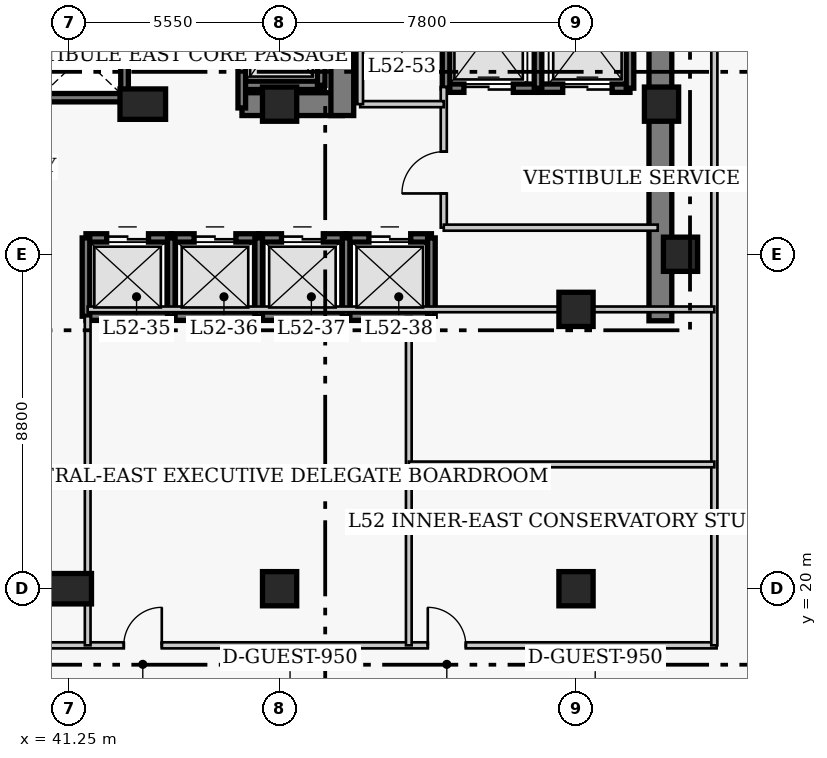
"""IFC4 building model, lengths in metres.
Left out: names, types, materials, properties, quantities, classifications, styles, units other than length and angle.
Written with IfcOpenShell. Run it as: python <this file> out.ifc"""

import sys

from ifc_helpers import new_model, si_unit, direction, frame, frame_2d, origin, origin_2d, place, context, subcontext, project, spatial, rectangle, extrude, element, fill, save


model = new_model("IFC4")
c1 = context("Model", 3, precision=1e-05, world=origin(), true_north=direction((0.0, 1.0)))
c2 = subcontext(c1, "Body", "Model", "MODEL_VIEW")
j1 = project(units=[si_unit("LENGTHUNIT", "METRE"), si_unit("PLANEANGLEUNIT", "RADIAN")], contexts=[c1])
p1 = place(None, origin())
s1 = spatial("IfcSite", under=j1, at=p1, CompositionType="ELEMENT")
p2 = place(p1, origin())
s2 = spatial("IfcBuilding", under=s1, at=p2, CompositionType="ELEMENT")
p3 = place(p2, frame((0.0, 0.0, 208.5)))
s3 = spatial("IfcBuildingStorey", under=s2, at=p3, CompositionType="ELEMENT", Elevation=208.5)
p4 = place(p3, frame((56.82, 27.05, 0.0), z_axis=(0.0, 0.0, 1.0), x_axis=(0.0, 1.0, 0.0)))
e1 = element("IfcWall", 1, at=p4, inside=s3, PredefinedType="SHEAR", context=c2, shape_type="SweptSolid", body=[
    extrude(rectangle(XDim=13.57, YDim=0.6, at=frame_2d((6.785, 0.0))), origin(), (0.0, 0.0, 1.0), 3.9),
])
p5 = place(p3, frame((45.81, 32.75, 0.0), z_axis=(0.0, 0.0, 1.0), x_axis=(1.0, 0.0, 0.0)))
e2 = element("IfcWall", 2, at=p5, inside=s3, PredefinedType="SHEAR", context=c2, shape_type="SweptSolid", body=[
    extrude(rectangle(XDim=2.64, YDim=0.6, at=frame_2d((1.32, 0.0))), origin(), (0.0, 0.0, 1.0), 3.9),
])
p6 = place(p3, frame((48.45, 32.45, 0.0), z_axis=(0.0, 0.0, 1.0), x_axis=(0.0, 1.0, 0.0)))
e3 = element("IfcWall", 3, at=p6, inside=s3, PredefinedType="SHEAR", context=c2, shape_type="SweptSolid", body=[
    extrude(rectangle(XDim=7.87, YDim=0.6, at=frame_2d((3.935, 0.0))), origin(), (0.0, 0.0, 1.0), 3.9),
])
p7 = place(p6, frame((5.75, 0.0, 0.0)))
e4 = element("IfcOpeningElement", 4, at=p7, cuts=e3, PredefinedType="OPENING", context=c2, shape_type="SweptSolid", body=[
    extrude(rectangle(XDim=1.1, YDim=2.15, at=frame_2d((0.55, 1.075))), frame((0.0, 0.31, 0.0), z_axis=(0.0, -1.0, 0.0), x_axis=(1.0, 0.0, 0.0)), (0.0, 0.0, 1.0), 0.62),
])
p8 = place(p3, frame((41.25, 20.0, 0.0), z_axis=(0.0, 0.0, 1.0), x_axis=(1.0, 0.0, 0.0)))
e5 = element("IfcColumn", 5, at=p8, inside=s3, PredefinedType="COLUMN", context=c2, shape_type="SweptSolid", body=[
    extrude(rectangle(XDim=1.2, YDim=0.8, at=origin_2d()), origin(), (0.0, 0.0, 1.0), 3.9),
])
for number, where, z_axis, x_axis in (
    (6, (46.8, 20.0, 0.0), (0.0, 0.0, 1.0), (1.0, 0.0, 0.0)),
    (7, (54.6, 20.0, 0.0), (0.0, 0.0, 1.0), (1.0, 0.0, 0.0)),
    (8, (57.35, 28.8, 0.0), (0.0, 0.0, 1.0), (1.0, 0.0, 0.0)),
):
    element("IfcColumn", number, at=place(p3, frame(where, z_axis=z_axis, x_axis=x_axis)), inside=s3, PredefinedType="COLUMN", context=c2, shape_type="SweptSolid", body=[
        extrude(rectangle(XDim=0.9, YDim=0.9, at=origin_2d()), origin(), (0.0, 0.0, 1.0), 3.9),
    ])
p9 = place(p3, frame((43.2, 32.75, 0.0), z_axis=(0.0, 0.0, 1.0), x_axis=(1.0, 0.0, 0.0)))
e9 = element("IfcColumn", 9, at=p9, inside=s3, PredefinedType="COLUMN", context=c2, shape_type="SweptSolid", body=[
    extrude(rectangle(XDim=1.2, YDim=0.8, at=origin_2d()), origin(), (0.0, 0.0, 1.0), 3.9),
])
for number, where, z_axis, x_axis in (
    (10, (46.8, 32.75, 0.0), (0.0, 0.0, 1.0), (1.0, 0.0, 0.0)),
    (11, (54.6, 27.35, 0.0), (0.0, 0.0, 1.0), (1.0, 0.0, 0.0)),
    (12, (56.85, 32.75, 0.0), (0.0, 0.0, 1.0), (1.0, 0.0, 0.0)),
):
    element("IfcColumn", number, at=place(p3, frame(where, z_axis=z_axis, x_axis=x_axis)), inside=s3, PredefinedType="COLUMN", context=c2, shape_type="SweptSolid", body=[
        extrude(rectangle(XDim=0.9, YDim=0.9, at=origin_2d()), origin(), (0.0, 0.0, 1.0), 3.9),
    ])
p10 = place(p3, frame((41.705, 29.23, 0.0), z_axis=(0.0, 0.0, 1.0), x_axis=(1.0, 0.0, 0.0)))
e13 = element("IfcWall", 13, at=p10, inside=s3, PredefinedType="SHEAR", context=c2, shape_type="SweptSolid", body=[
    extrude(rectangle(XDim=2.245, YDim=0.22, at=frame_2d((1.123, 0.0))), origin(), (0.0, 0.0, 1.0), 3.9),
])
p11 = place(p10, frame((0.545, 0.0, 0.0)))
e14 = element("IfcOpeningElement", 14, at=p11, cuts=e13, PredefinedType="OPENING", context=c2, shape_type="SweptSolid", body=[
    extrude(rectangle(XDim=1.1, YDim=2.15, at=frame_2d((0.55, 1.075))), frame((0.0, 0.12, 0.0), z_axis=(0.0, -1.0, 0.0), x_axis=(1.0, 0.0, 0.0)), (0.0, 0.0, 1.0), 0.24),
])
p12 = place(p3, frame((41.705, 27.17, 0.0), z_axis=(0.0, 0.0, 1.0), x_axis=(1.0, 0.0, 0.0)))
e15 = element("IfcWall", 15, at=p12, inside=s3, PredefinedType="SHEAR", context=c2, shape_type="SweptSolid", body=[
    extrude(rectangle(XDim=2.245, YDim=0.22, at=frame_2d((1.123, 0.0))), origin(), (0.0, 0.0, 1.0), 3.9),
])
p13 = place(p3, frame((41.705, 27.17, 0.0), z_axis=(0.0, 0.0, 1.0), x_axis=(0.0, 1.0, 0.0)))
e16 = element("IfcWall", 16, at=p13, inside=s3, PredefinedType="SHEAR", context=c2, shape_type="SweptSolid", body=[
    extrude(rectangle(XDim=2.06, YDim=0.2, at=frame_2d((1.03, 0.0))), origin(), (0.0, 0.0, 1.0), 3.9),
])
p14 = place(p3, frame((43.95, 29.23, 0.0), z_axis=(0.0, 0.0, 1.0), x_axis=(1.0, 0.0, 0.0)))
e17 = element("IfcWall", 17, at=p14, inside=s3, PredefinedType="SHEAR", context=c2, shape_type="SweptSolid", body=[
    extrude(rectangle(XDim=2.3, YDim=0.22, at=frame_2d((1.15, 0.0))), origin(), (0.0, 0.0, 1.0), 3.9),
])
p15 = place(p14, frame((0.6, 0.0, 0.0)))
e18 = element("IfcOpeningElement", 18, at=p15, cuts=e17, PredefinedType="OPENING", context=c2, shape_type="SweptSolid", body=[
    extrude(rectangle(XDim=1.1, YDim=2.15, at=frame_2d((0.55, 1.075))), frame((0.0, 0.12, 0.0), z_axis=(0.0, -1.0, 0.0), x_axis=(1.0, 0.0, 0.0)), (0.0, 0.0, 1.0), 0.24),
])
p16 = place(p3, frame((43.95, 27.17, 0.0), z_axis=(0.0, 0.0, 1.0), x_axis=(1.0, 0.0, 0.0)))
e19 = element("IfcWall", 19, at=p16, inside=s3, PredefinedType="SHEAR", context=c2, shape_type="SweptSolid", body=[
    extrude(rectangle(XDim=2.3, YDim=0.22, at=frame_2d((1.15, 0.0))), origin(), (0.0, 0.0, 1.0), 3.9),
])
p17 = place(p3, frame((43.95, 27.17, 0.0), z_axis=(0.0, 0.0, 1.0), x_axis=(0.0, 1.0, 0.0)))
e20 = element("IfcWall", 20, at=p17, inside=s3, PredefinedType="SHEAR", context=c2, shape_type="SweptSolid", body=[
    extrude(rectangle(XDim=2.06, YDim=0.2, at=frame_2d((1.03, 0.0))), origin(), (0.0, 0.0, 1.0), 3.9),
])
p18 = place(p3, frame((46.25, 29.23, 0.0), z_axis=(0.0, 0.0, 1.0), x_axis=(1.0, 0.0, 0.0)))
e21 = element("IfcWall", 21, at=p18, inside=s3, PredefinedType="SHEAR", context=c2, shape_type="SweptSolid", body=[
    extrude(rectangle(XDim=2.3, YDim=0.22, at=frame_2d((1.15, 0.0))), origin(), (0.0, 0.0, 1.0), 3.9),
])
p19 = place(p18, frame((0.6, 0.0, 0.0)))
e22 = element("IfcOpeningElement", 22, at=p19, cuts=e21, PredefinedType="OPENING", context=c2, shape_type="SweptSolid", body=[
    extrude(rectangle(XDim=1.1, YDim=2.15, at=frame_2d((0.55, 1.075))), frame((0.0, 0.12, 0.0), z_axis=(0.0, -1.0, 0.0), x_axis=(1.0, 0.0, 0.0)), (0.0, 0.0, 1.0), 0.24),
])
p20 = place(p3, frame((46.25, 27.17, 0.0), z_axis=(0.0, 0.0, 1.0), x_axis=(1.0, 0.0, 0.0)))
e23 = element("IfcWall", 23, at=p20, inside=s3, PredefinedType="SHEAR", context=c2, shape_type="SweptSolid", body=[
    extrude(rectangle(XDim=2.3, YDim=0.22, at=frame_2d((1.15, 0.0))), origin(), (0.0, 0.0, 1.0), 3.9),
])
p21 = place(p3, frame((46.25, 27.17, 0.0), z_axis=(0.0, 0.0, 1.0), x_axis=(0.0, 1.0, 0.0)))
e24 = element("IfcWall", 24, at=p21, inside=s3, PredefinedType="SHEAR", context=c2, shape_type="SweptSolid", body=[
    extrude(rectangle(XDim=2.06, YDim=0.2, at=frame_2d((1.03, 0.0))), origin(), (0.0, 0.0, 1.0), 3.9),
])
p22 = place(p3, frame((48.55, 29.23, 0.0), z_axis=(0.0, 0.0, 1.0), x_axis=(1.0, 0.0, 0.0)))
e25 = element("IfcWall", 25, at=p22, inside=s3, PredefinedType="SHEAR", context=c2, shape_type="SweptSolid", body=[
    extrude(rectangle(XDim=2.245, YDim=0.22, at=frame_2d((1.123, 0.0))), origin(), (0.0, 0.0, 1.0), 3.9),
])
p23 = place(p22, frame((0.6, 0.0, 0.0)))
e26 = element("IfcOpeningElement", 26, at=p23, cuts=e25, PredefinedType="OPENING", context=c2, shape_type="SweptSolid", body=[
    extrude(rectangle(XDim=1.1, YDim=2.15, at=frame_2d((0.55, 1.075))), frame((0.0, 0.12, 0.0), z_axis=(0.0, -1.0, 0.0), x_axis=(1.0, 0.0, 0.0)), (0.0, 0.0, 1.0), 0.24),
])
p24 = place(p3, frame((48.55, 27.17, 0.0), z_axis=(0.0, 0.0, 1.0), x_axis=(1.0, 0.0, 0.0)))
e27 = element("IfcWall", 27, at=p24, inside=s3, PredefinedType="SHEAR", context=c2, shape_type="SweptSolid", body=[
    extrude(rectangle(XDim=2.245, YDim=0.22, at=frame_2d((1.123, 0.0))), origin(), (0.0, 0.0, 1.0), 3.9),
])
for number, where, z_axis, x_axis in (
    (28, (48.55, 27.17, 0.0), (0.0, 0.0, 1.0), (0.0, 1.0, 0.0)),
    (29, (50.795, 27.17, 0.0), (0.0, 0.0, 1.0), (0.0, 1.0, 0.0)),
):
    element("IfcWall", number, at=place(p3, frame(where, z_axis=z_axis, x_axis=x_axis)), inside=s3, PredefinedType="SHEAR", context=c2, shape_type="SweptSolid", body=[
        extrude(rectangle(XDim=2.06, YDim=0.2, at=frame_2d((1.03, 0.0))), origin(), (0.0, 0.0, 1.0), 3.9),
    ])
p25 = place(p3, frame((40.4, 32.92, 0.0), z_axis=(0.0, 0.0, 1.0), x_axis=(1.0, 0.0, 0.0)))
e30 = element("IfcWall", 30, at=p25, inside=s3, PredefinedType="SHEAR", context=c2, shape_type="SweptSolid", body=[
    extrude(rectangle(XDim=2.32, YDim=0.22, at=frame_2d((1.16, 0.0))), origin(), (0.0, 0.0, 1.0), 3.9),
])
p26 = place(p3, frame((42.72, 32.92, 0.0), z_axis=(0.0, 0.0, 1.0), x_axis=(0.0, 1.0, 0.0)))
e31 = element("IfcWall", 31, at=p26, inside=s3, PredefinedType="SHEAR", context=c2, shape_type="SweptSolid", body=[
    extrude(rectangle(XDim=2.16, YDim=0.2, at=frame_2d((1.08, 0.0))), origin(), (0.0, 0.0, 1.0), 3.9),
])
p27 = place(p3, frame((51.18, 33.17, 0.0), z_axis=(0.0, 0.0, 1.0), x_axis=(1.0, 0.0, 0.0)))
e32 = element("IfcWall", 32, at=p27, inside=s3, PredefinedType="SHEAR", context=c2, shape_type="SweptSolid", body=[
    extrude(rectangle(XDim=2.42, YDim=0.22, at=frame_2d((1.21, 0.0))), origin(), (0.0, 0.0, 1.0), 3.9),
])
p28 = place(p27, frame((0.47, 0.0, 0.0)))
e33 = element("IfcOpeningElement", 33, at=p28, cuts=e32, PredefinedType="OPENING", context=c2, shape_type="SweptSolid", body=[
    extrude(rectangle(XDim=1.3, YDim=2.15, at=frame_2d((0.65, 1.075))), frame((0.0, 0.12, 0.0), z_axis=(0.0, -1.0, 0.0), x_axis=(1.0, 0.0, 0.0)), (0.0, 0.0, 1.0), 0.24),
])
p29 = place(p3, frame((51.18, 33.17, 0.0), z_axis=(0.0, 0.0, 1.0), x_axis=(0.0, 1.0, 0.0)))
e34 = element("IfcWall", 34, at=p29, inside=s3, PredefinedType="SHEAR", context=c2, shape_type="SweptSolid", body=[
    extrude(rectangle(XDim=2.86, YDim=0.2, at=frame_2d((1.43, 0.0))), origin(), (0.0, 0.0, 1.0), 3.9),
])
p30 = place(p3, frame((53.6, 33.17, 0.0), z_axis=(0.0, 0.0, 1.0), x_axis=(1.0, 0.0, 0.0)))
e35 = element("IfcWall", 35, at=p30, inside=s3, PredefinedType="SHEAR", context=c2, shape_type="SweptSolid", body=[
    extrude(rectangle(XDim=2.42, YDim=0.22, at=frame_2d((1.21, 0.0))), origin(), (0.0, 0.0, 1.0), 3.9),
])
p31 = place(p30, frame((0.65, 0.0, 0.0)))
e36 = element("IfcOpeningElement", 36, at=p31, cuts=e35, PredefinedType="OPENING", context=c2, shape_type="SweptSolid", body=[
    extrude(rectangle(XDim=1.3, YDim=2.15, at=frame_2d((0.65, 1.075))), frame((0.0, 0.12, 0.0), z_axis=(0.0, -1.0, 0.0), x_axis=(1.0, 0.0, 0.0)), (0.0, 0.0, 1.0), 0.24),
])
for number, where, z_axis, x_axis in (
    (37, (53.6, 33.17, 0.0), (0.0, 0.0, 1.0), (0.0, 1.0, 0.0)),
    (38, (56.02, 33.17, 0.0), (0.0, 0.0, 1.0), (0.0, 1.0, 0.0)),
):
    element("IfcWall", number, at=place(p3, frame(where, z_axis=z_axis, x_axis=x_axis)), inside=s3, PredefinedType="SHEAR", context=c2, shape_type="SweptSolid", body=[
        extrude(rectangle(XDim=2.86, YDim=0.2, at=frame_2d((1.43, 0.0))), origin(), (0.0, 0.0, 1.0), 3.9),
    ])
p32 = place(p3, frame((45.805, 33.245, 0.0), z_axis=(0.0, 0.0, 1.0), x_axis=(1.0, 0.0, 0.0)))
e39 = element("IfcWall", 39, at=p32, inside=s3, PredefinedType="SHEAR", context=c2, shape_type="SweptSolid", body=[
    extrude(rectangle(XDim=2.09, YDim=0.22, at=frame_2d((1.045, 0.0))), origin(), (0.0, 0.0, 1.0), 3.9),
])
p33 = place(p3, frame((45.805, 32.65, 0.0), z_axis=(0.0, 0.0, 1.0), x_axis=(0.0, 1.0, 0.0)))
e40 = element("IfcWall", 40, at=p33, inside=s3, PredefinedType="SHEAR", context=c2, shape_type="SweptSolid", body=[
    extrude(rectangle(XDim=3.505, YDim=0.2, at=frame_2d((1.752, 0.0))), origin(), (0.0, 0.0, 1.0), 3.9),
])
p34 = place(p3, frame((47.895, 33.245, 0.0), z_axis=(0.0, 0.0, 1.0), x_axis=(0.0, 1.0, 0.0)))
e41 = element("IfcWall", 41, at=p34, inside=s3, PredefinedType="SHEAR", context=c2, shape_type="SweptSolid", body=[
    extrude(rectangle(XDim=2.91, YDim=0.2, at=frame_2d((1.455, 0.0))), origin(), (0.0, 0.0, 1.0), 3.9),
])
p35 = place(p3, frame((51.12, 29.5, 0.0), z_axis=(0.0, 0.0, 1.0), x_axis=(0.0, 1.0, 0.0)))
e42 = element("IfcWall", 42, at=p35, inside=s3, PredefinedType="PARTITIONING", context=c2, shape_type="SweptSolid", body=[
    extrude(rectangle(XDim=3.7, YDim=0.16, at=frame_2d((1.85, 0.0))), origin(), (0.0, 0.0, 1.0), 3.65),
])
p36 = place(p35, frame((0.9, 0.0, 0.0)))
e43 = element("IfcOpeningElement", 43, at=p36, cuts=e42, PredefinedType="OPENING", context=c2, shape_type="SweptSolid", body=[
    extrude(rectangle(XDim=1.1, YDim=2.15, at=frame_2d((0.55, 1.075))), frame((0.0, 0.09, 0.0), z_axis=(0.0, -1.0, 0.0), x_axis=(1.0, 0.0, 0.0)), (0.0, 0.0, 1.0), 0.18),
])
p37 = place(p3, frame((51.12, 29.5, 0.0), z_axis=(0.0, 0.0, 1.0), x_axis=(1.0, 0.0, 0.0)))
e44 = element("IfcWall", 44, at=p37, inside=s3, PredefinedType="PARTITIONING", context=c2, shape_type="SweptSolid", body=[
    extrude(rectangle(XDim=5.63, YDim=0.16, at=frame_2d((2.815, 0.0))), origin(), (0.0, 0.0, 1.0), 3.65),
])
p38 = place(p3, frame((48.92, 32.75, 0.0), z_axis=(0.0, 0.0, 1.0), x_axis=(1.0, 0.0, 0.0)))
e45 = element("IfcWall", 45, at=p38, inside=s3, PredefinedType="PARTITIONING", context=c2, shape_type="SweptSolid", body=[
    extrude(rectangle(XDim=2.2, YDim=0.16, at=frame_2d((1.1, 0.0))), origin(), (0.0, 0.0, 1.0), 3.65),
])
p39 = place(p3, frame((48.92, 32.75, 0.0), z_axis=(0.0, 0.0, 1.0), x_axis=(0.0, 1.0, 0.0)))
e46 = element("IfcWall", 46, at=p39, inside=s3, PredefinedType="PARTITIONING", context=c2, shape_type="SweptSolid", body=[
    extrude(rectangle(XDim=3.62, YDim=0.15, at=frame_2d((1.81, 0.0))), origin(), (0.0, 0.0, 1.0), 3.65),
])
p40 = place(p3, frame((35.85, 18.51, 0.0), z_axis=(0.0, 0.0, 1.0), x_axis=(1.0, 0.0, 0.0)))
e47 = element("IfcWall", 47, at=p40, inside=s3, PredefinedType="PARTITIONING", context=c2, shape_type="SweptSolid", body=[
    extrude(rectangle(XDim=22.45, YDim=0.16, at=frame_2d((11.225, 0.0))), origin(), (0.0, 0.0, 1.0), 3.65),
])
p41 = place(p40, frame((6.85, 0.0, 0.0)))
e48 = element("IfcOpeningElement", 48, at=p41, cuts=e47, PredefinedType="OPENING", context=c2, shape_type="SweptSolid", body=[
    extrude(rectangle(XDim=1.0, YDim=2.15, at=frame_2d((0.5, 1.075))), frame((0.0, 0.09, 0.0), z_axis=(0.0, -1.0, 0.0), x_axis=(1.0, 0.0, 0.0)), (0.0, 0.0, 1.0), 0.18),
])
p42 = place(p40, frame((14.85, 0.0, 0.0)))
e49 = element("IfcOpeningElement", 49, at=p42, cuts=e47, PredefinedType="OPENING", context=c2, shape_type="SweptSolid", body=[
    extrude(rectangle(XDim=1.0, YDim=2.15, at=frame_2d((0.5, 1.075))), frame((0.0, 0.09, 0.0), z_axis=(0.0, -1.0, 0.0), x_axis=(1.0, 0.0, 0.0)), (0.0, 0.0, 1.0), 0.18),
])
p43 = place(p3, frame((58.24, 18.51, 0.0), z_axis=(0.0, 0.0, 1.0), x_axis=(0.0, 1.0, 0.0)))
e50 = element("IfcWall", 50, at=p43, inside=s3, PredefinedType="PARTITIONING", context=c2, shape_type="SweptSolid", body=[
    extrude(rectangle(XDim=22.14, YDim=0.16, at=frame_2d((11.07, 0.0))), origin(), (0.0, 0.0, 1.0), 3.65),
])
p44 = place(p3, frame((41.75, 18.51, 0.0), z_axis=(0.0, 0.0, 1.0), x_axis=(0.0, 1.0, 0.0)))
e51 = element("IfcWall", 51, at=p44, inside=s3, PredefinedType="PARTITIONING", context=c2, shape_type="SweptSolid", body=[
    extrude(rectangle(XDim=8.66, YDim=0.15, at=frame_2d((4.33, 0.0))), origin(), (0.0, 0.0, 1.0), 3.65),
])
p45 = place(p3, frame((50.2, 18.51, 0.0), z_axis=(0.0, 0.0, 1.0), x_axis=(0.0, 1.0, 0.0)))
e52 = element("IfcWall", 52, at=p45, inside=s3, PredefinedType="PARTITIONING", context=c2, shape_type="SweptSolid", body=[
    extrude(rectangle(XDim=8.64, YDim=0.15, at=frame_2d((4.32, 0.0))), origin(), (0.0, 0.0, 1.0), 3.65),
])
p46 = place(p3, frame((41.75, 27.35, 0.0), z_axis=(0.0, 0.0, 1.0), x_axis=(1.0, 0.0, 0.0)))
e53 = element("IfcWall", 53, at=p46, inside=s3, PredefinedType="PARTITIONING", context=c2, shape_type="SweptSolid", body=[
    extrude(rectangle(XDim=16.49, YDim=0.15, at=frame_2d((8.245, 0.0))), origin(), (0.0, 0.0, 1.0), 3.65),
])
p47 = place(p3, frame((50.2, 23.27, 0.0), z_axis=(0.0, 0.0, 1.0), x_axis=(1.0, 0.0, 0.0)))
e54 = element("IfcWall", 54, at=p47, inside=s3, PredefinedType="PARTITIONING", context=c2, shape_type="SweptSolid", body=[
    extrude(rectangle(XDim=8.04, YDim=0.15, at=frame_2d((4.02, 0.0))), origin(), (0.0, 0.0, 1.0), 3.65),
])
p48 = place(p11, origin())
e55 = element("IfcDoor", 55, at=p48, inside=s3, OperationType="DOUBLE_DOOR_SLIDING", PredefinedType="DOOR", context=c2, shape_type="SweptSolid", body=[
    extrude(rectangle(XDim=1.1, YDim=2.15, at=frame_2d((0.55, 1.075))), frame((0.0, 0.025, 0.0), z_axis=(0.0, -1.0, 0.0), x_axis=(1.0, 0.0, 0.0)), (0.0, 0.0, 1.0), 0.05),
])
fill(e14, e55)
p49 = place(p15, origin())
e56 = element("IfcDoor", 56, at=p49, inside=s3, OperationType="DOUBLE_DOOR_SLIDING", PredefinedType="DOOR", context=c2, shape_type="SweptSolid", body=[
    extrude(rectangle(XDim=1.1, YDim=2.15, at=frame_2d((0.55, 1.075))), frame((0.0, 0.025, 0.0), z_axis=(0.0, -1.0, 0.0), x_axis=(1.0, 0.0, 0.0)), (0.0, 0.0, 1.0), 0.05),
])
fill(e18, e56)
p50 = place(p19, origin())
e57 = element("IfcDoor", 57, at=p50, inside=s3, OperationType="DOUBLE_DOOR_SLIDING", PredefinedType="DOOR", context=c2, shape_type="SweptSolid", body=[
    extrude(rectangle(XDim=1.1, YDim=2.15, at=frame_2d((0.55, 1.075))), frame((0.0, 0.025, 0.0), z_axis=(0.0, -1.0, 0.0), x_axis=(1.0, 0.0, 0.0)), (0.0, 0.0, 1.0), 0.05),
])
fill(e22, e57)
p51 = place(p23, origin())
e58 = element("IfcDoor", 58, at=p51, inside=s3, OperationType="DOUBLE_DOOR_SLIDING", PredefinedType="DOOR", context=c2, shape_type="SweptSolid", body=[
    extrude(rectangle(XDim=1.1, YDim=2.15, at=frame_2d((0.55, 1.075))), frame((0.0, 0.025, 0.0), z_axis=(0.0, -1.0, 0.0), x_axis=(1.0, 0.0, 0.0)), (0.0, 0.0, 1.0), 0.05),
])
fill(e26, e58)
p52 = place(p28, origin())
e59 = element("IfcDoor", 59, at=p52, inside=s3, OperationType="DOUBLE_DOOR_SLIDING", PredefinedType="DOOR", context=c2, shape_type="SweptSolid", body=[
    extrude(rectangle(XDim=1.3, YDim=2.15, at=frame_2d((0.65, 1.075))), frame((0.0, 0.025, 0.0), z_axis=(0.0, -1.0, 0.0), x_axis=(1.0, 0.0, 0.0)), (0.0, 0.0, 1.0), 0.05),
])
fill(e33, e59)
p53 = place(p31, origin())
e60 = element("IfcDoor", 60, at=p53, inside=s3, OperationType="DOUBLE_DOOR_SLIDING", PredefinedType="DOOR", context=c2, shape_type="SweptSolid", body=[
    extrude(rectangle(XDim=1.3, YDim=2.15, at=frame_2d((0.65, 1.075))), frame((0.0, 0.025, 0.0), z_axis=(0.0, -1.0, 0.0), x_axis=(1.0, 0.0, 0.0)), (0.0, 0.0, 1.0), 0.05),
])
fill(e36, e60)
p54 = place(p36, origin())
e61 = element("IfcDoor", 61, at=p54, inside=s3, OperationType="SINGLE_SWING_LEFT", PredefinedType="DOOR", context=c2, shape_type="SweptSolid", body=[
    extrude(rectangle(XDim=1.1, YDim=2.15, at=frame_2d((0.55, 1.075))), frame((0.0, 0.025, 0.0), z_axis=(0.0, -1.0, 0.0), x_axis=(1.0, 0.0, 0.0)), (0.0, 0.0, 1.0), 0.05),
])
fill(e43, e61)
p55 = place(p41, origin())
e62 = element("IfcDoor", 62, at=p55, inside=s3, OperationType="SINGLE_SWING_RIGHT", PredefinedType="DOOR", context=c2, shape_type="SweptSolid", body=[
    extrude(rectangle(XDim=1.0, YDim=2.15, at=frame_2d((0.5, 1.075))), frame((0.0, 0.025, 0.0), z_axis=(0.0, -1.0, 0.0), x_axis=(1.0, 0.0, 0.0)), (0.0, 0.0, 1.0), 0.05),
])
fill(e48, e62)
p56 = place(p42, origin())
e63 = element("IfcDoor", 63, at=p56, inside=s3, OperationType="SINGLE_SWING_LEFT", PredefinedType="DOOR", context=c2, shape_type="SweptSolid", body=[
    extrude(rectangle(XDim=1.0, YDim=2.15, at=frame_2d((0.5, 1.075))), frame((0.0, 0.025, 0.0), z_axis=(0.0, -1.0, 0.0), x_axis=(1.0, 0.0, 0.0)), (0.0, 0.0, 1.0), 0.05),
])
fill(e49, e63)
save(model, sys.argv[1])
